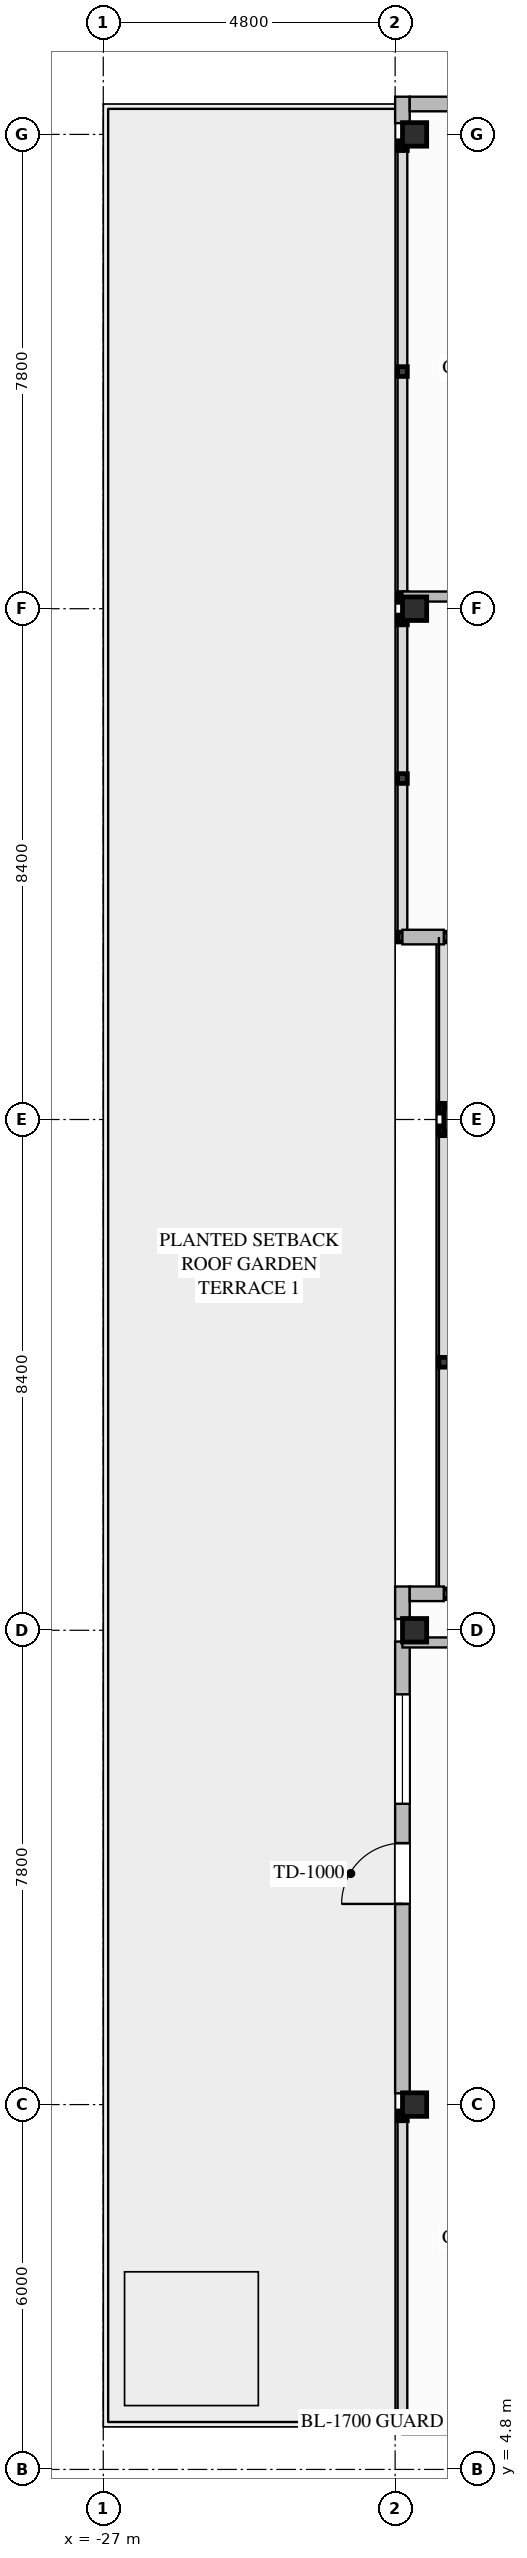
"""IFC4 building model, lengths in metres.
Left out: names, types, materials, properties, quantities, classifications, styles, units other than length and angle.
Written with IfcOpenShell. Run it as: python <this file> out.ifc"""

import sys

from ifc_helpers import new_model, si_unit, direction, frame, frame_2d, origin, origin_2d, place, context, subcontext, project, spatial, rectangle, i_section, extrude, element, fill, save


model = new_model("IFC4")
c1 = context("Model", 3, precision=1e-05, world=origin(), true_north=direction((0.0, 1.0)))
c2 = subcontext(c1, "Body", "Model", "MODEL_VIEW")
j1 = project(units=[si_unit("LENGTHUNIT", "METRE"), si_unit("PLANEANGLEUNIT", "RADIAN")], contexts=[c1])
p1 = place(None, origin())
s1 = spatial("IfcSite", under=j1, at=p1, CompositionType="ELEMENT")
p2 = place(p1, origin())
s2 = spatial("IfcBuilding", under=s1, at=p2, CompositionType="ELEMENT")
p3 = place(p2, frame((0.0, 0.0, 205.1)))
s3 = spatial("IfcBuildingStorey", under=s2, at=p3, CompositionType="ELEMENT", Elevation=205.1)
for number, where, z_axis, x_axis in (
    (1, (-21.88, 10.8, -0.26), (0.0, 0.0, 1.0), (1.0, 0.0, 0.0)),
    (2, (-21.88, 18.6, -0.26), (0.0, 0.0, 1.0), (1.0, 0.0, 0.0)),
    (3, (-21.2, 27.0, -0.26), (0.0, 0.0, 1.0), (1.0, 0.0, 0.0)),
    (4, (-21.88, 35.4, -0.26), (0.0, 0.0, 1.0), (1.0, 0.0, 0.0)),
    (5, (-21.88, 43.2, -0.26), (0.0, 0.0, 1.0), (1.0, 0.0, 0.0)),
):
    element("IfcColumn", number, at=place(p3, frame(where, z_axis=z_axis, x_axis=x_axis)), inside=s3, PredefinedType="COLUMN", context=c2, shape_type="SweptSolid", body=[
        extrude(i_section(OverallWidth=0.397, OverallDepth=0.387, WebThickness=0.021, FlangeThickness=0.033, FilletRadius=0.025, at=origin_2d()), origin(), (0.0, 0.0, 1.0), 3.857),
    ])
p4 = place(p3, frame((-22.08, 10.985, 0.0), z_axis=(0.0, 0.0, 1.0), x_axis=(0.0, 1.0, 0.0)))
e6 = element("IfcWall", 6, at=p4, inside=s3, PredefinedType="STANDARD", context=c2, shape_type="SweptSolid", body=[
    extrude(rectangle(XDim=7.429, YDim=0.24, at=frame_2d((3.715, 0.0))), origin(), (0.0, 0.0, 1.0), 2.803),
])
p5 = place(p4, frame((3.115, 0.0, 0.0)))
e7 = element("IfcOpeningElement", 7, at=p5, cuts=e6, PredefinedType="OPENING", context=c2, shape_type="SweptSolid", body=[
    extrude(rectangle(XDim=1.0, YDim=2.2, at=frame_2d((0.5, 1.1))), frame((0.0, 0.13, 0.0), z_axis=(0.0, -1.0, 0.0), x_axis=(1.0, 0.0, 0.0)), (0.0, 0.0, 1.0), 0.26),
])
p6 = place(p4, frame((4.761, 0.0, 0.75)))
e8 = element("IfcOpeningElement", 8, at=p6, cuts=e6, PredefinedType="OPENING", context=c2, shape_type="SweptSolid", body=[
    extrude(rectangle(XDim=1.8, YDim=1.953, at=frame_2d((0.9, 0.977))), frame((0.0, 0.13, 0.0), z_axis=(0.0, -1.0, 0.0), x_axis=(1.0, 0.0, 0.0)), (0.0, 0.0, 1.0), 0.26),
])
p7 = place(p3, frame((-22.08, 18.785, 0.0), z_axis=(0.0, 0.0, 1.0), x_axis=(0.0, 1.0, 0.0)))
e9 = element("IfcWall", 9, at=p7, inside=s3, PredefinedType="STANDARD", context=c2, shape_type="SweptSolid", body=[
    extrude(rectangle(XDim=0.535, YDim=0.24, at=frame_2d((0.267, 0.0))), origin(), (0.0, 0.0, 1.0), 3.34),
])
p8 = place(p3, frame((-22.08, 43.385, 0.0), z_axis=(0.0, 0.0, 1.0), x_axis=(0.0, 1.0, 0.0)))
e10 = element("IfcWall", 10, at=p8, inside=s3, PredefinedType="STANDARD", context=c2, shape_type="SweptSolid", body=[
    extrude(rectangle(XDim=0.435, YDim=0.24, at=frame_2d((0.217, 0.0))), origin(), (0.0, 0.0, 1.0), 3.34),
])
p9 = place(p3, frame((-16.7, 5.5, 0.0), z_axis=(0.0, 0.0, 1.0), x_axis=(-1.0, 0.0, 0.0)))
e11 = element("IfcWall", 11, at=p9, inside=s3, PredefinedType="STANDARD", context=c2, shape_type="SweptSolid", body=[
    extrude(rectangle(XDim=5.38, YDim=0.24, at=frame_2d((2.69, 0.0))), origin(), (0.0, 0.0, 1.0), 3.34),
])
p10 = place(p3, frame((-21.96, 43.7, 0.0), z_axis=(0.0, 0.0, 1.0), x_axis=(1.0, 0.0, 0.0)))
e12 = element("IfcWall", 12, at=p10, inside=s3, PredefinedType="STANDARD", context=c2, shape_type="SweptSolid", body=[
    extrude(rectangle(XDim=5.26, YDim=0.24, at=frame_2d((2.63, 0.0))), origin(), (0.0, 0.0, 1.0), 3.34),
])
p11 = place(p3, frame((-21.96, 19.2, 0.0), z_axis=(0.0, 0.0, 1.0), x_axis=(1.0, 0.0, 0.0)))
e13 = element("IfcWall", 13, at=p11, inside=s3, PredefinedType="STANDARD", context=c2, shape_type="SweptSolid", body=[
    extrude(rectangle(XDim=0.56, YDim=0.24, at=frame_2d((0.28, 0.0))), origin(), (0.0, 0.0, 1.0), 3.34),
])
p12 = place(p3, frame((-21.4, 30.0, 0.0), z_axis=(0.0, 0.0, 1.0), x_axis=(-1.0, 0.0, 0.0)))
e14 = element("IfcWall", 14, at=p12, inside=s3, PredefinedType="STANDARD", context=c2, shape_type="SweptSolid", body=[
    extrude(rectangle(XDim=0.68, YDim=0.24, at=frame_2d((0.34, 0.0))), origin(), (0.0, 0.0, 1.0), 3.34),
])
for number, where, z_axis, x_axis in (
    (15, (-22.08, 18.4, 0.0), (0.0, 0.0, 1.0), (1.0, 0.0, 0.0)),
    (16, (-22.08, 35.6, 0.0), (0.0, 0.0, 1.0), (1.0, 0.0, 0.0)),
):
    element("IfcWall", number, at=place(p3, frame(where, z_axis=z_axis, x_axis=x_axis)), inside=s3, PredefinedType="PARTITIONING", context=c2, shape_type="SweptSolid", body=[
        extrude(rectangle(XDim=5.88, YDim=0.165, at=frame_2d((2.94, 0.0))), origin(), (0.0, 0.0, 1.0), 2.714),
    ])
p13 = place(p3, frame((-21.4, 27.0, 0.0), z_axis=(0.0, 0.0, 1.0), x_axis=(1.0, 0.0, 0.0)))
e17 = element("IfcWall", 17, at=p13, inside=s3, PredefinedType="PARTITIONING", context=c2, shape_type="SweptSolid", body=[
    extrude(rectangle(XDim=12.8, YDim=0.165, at=frame_2d((6.4, 0.0))), origin(), (0.0, 0.0, 1.0), 2.714),
])
p14 = place(p5, origin())
e18 = element("IfcDoor", 18, at=p14, inside=s3, OperationType="SINGLE_SWING_LEFT", PredefinedType="DOOR", context=c2, shape_type="SweptSolid", body=[
    extrude(rectangle(XDim=1.0, YDim=2.2, at=frame_2d((0.5, 1.1))), frame((0.0, 0.025, 0.0), z_axis=(0.0, -1.0, 0.0), x_axis=(1.0, 0.0, 0.0)), (0.0, 0.0, 1.0), 0.05),
])
fill(e7, e18)
p15 = place(p6, origin())
e19 = element("IfcWindow", 19, at=p15, inside=s3, PartitioningType="SINGLE_PANEL", PredefinedType="WINDOW", context=c2, shape_type="SweptSolid", body=[
    extrude(rectangle(XDim=1.8, YDim=1.953, at=frame_2d((0.9, 0.977))), frame((0.0, 0.03, 0.0), z_axis=(0.0, -1.0, 0.0), x_axis=(1.0, 0.0, 0.0)), (0.0, 0.0, 1.0), 0.06),
])
fill(e8, e19)
save(model, sys.argv[1])
